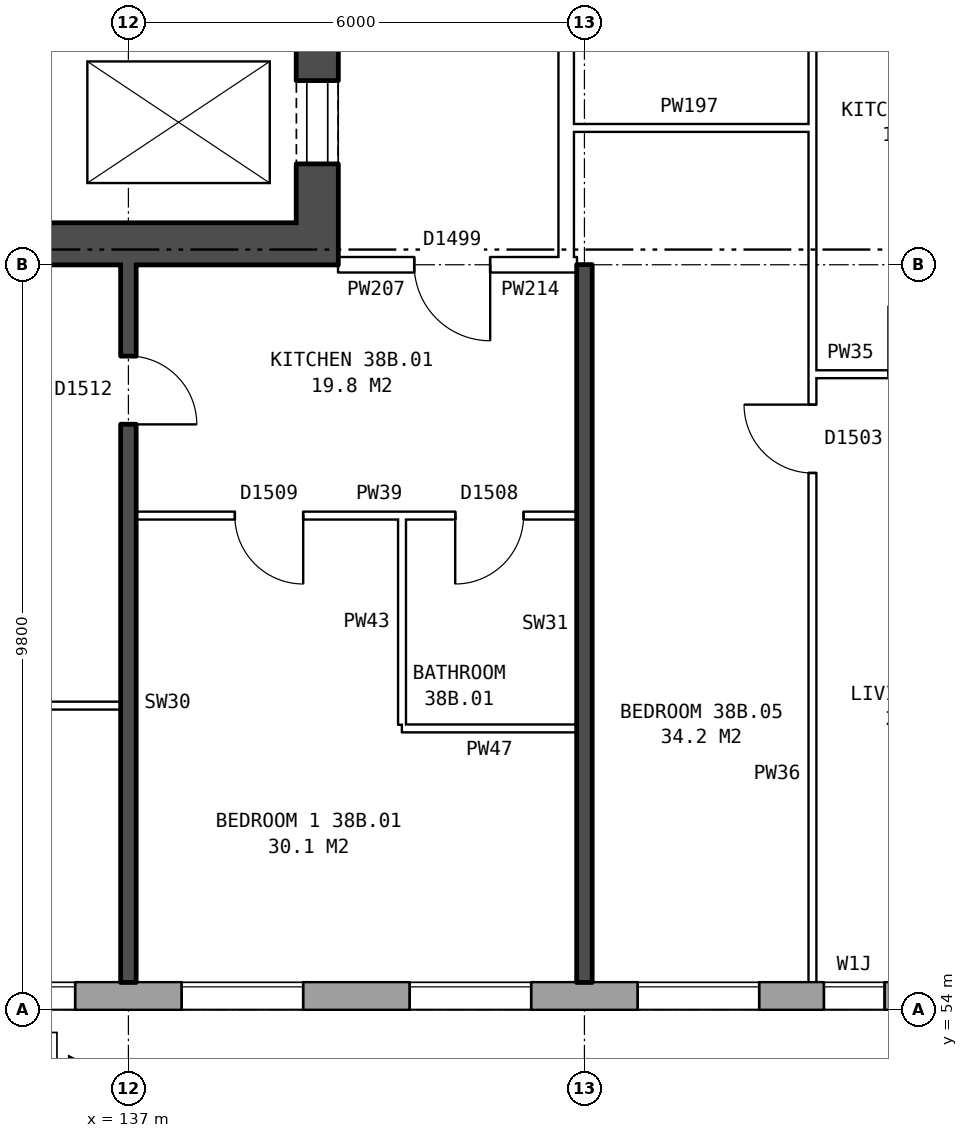
"""IFC4 building model, lengths in metres.
Left out: names, types, materials, properties, quantities, classifications, styles, units other than length and angle.
Written with IfcOpenShell. Run it as: python <this file> out.ifc"""

import sys

from ifc_helpers import new_model, si_unit, direction, frame, frame_2d, origin, place, context, subcontext, project, spatial, rectangle, extrude, element, fill, save


model = new_model("IFC4")
c1 = context("Model", 3, precision=1e-05, world=origin(), true_north=direction((0.0, 1.0)))
c2 = subcontext(c1, "Body", "Model", "MODEL_VIEW")
j1 = project(units=[si_unit("LENGTHUNIT", "METRE"), si_unit("PLANEANGLEUNIT", "RADIAN")], contexts=[c1])
p1 = place(None, origin())
s1 = spatial("IfcSite", under=j1, at=p1, CompositionType="ELEMENT")
p2 = place(p1, origin())
s2 = spatial("IfcBuilding", under=s1, at=p2, CompositionType="ELEMENT")
p3 = place(p2, frame((0.0, 0.0, 136.1)))
s3 = spatial("IfcBuildingStorey", under=s2, at=p3, CompositionType="ELEMENT", Elevation=136.1)
p4 = place(p3, frame((134.075, 54.18, 0.0), z_axis=(0.0, 0.0, 1.0), x_axis=(1.0, 0.0, 0.0)))
e1 = element("IfcWall", 1, at=p4, inside=s3, PredefinedType="STANDARD", context=c2, shape_type="SweptSolid", body=[
    extrude(rectangle(XDim=35.601, YDim=0.36, at=frame_2d((17.8, 0.0))), origin(), (0.0, 0.0, 1.0), 2.85),
])
p5 = place(p4, frame((0.625, 0.0, 0.8)))
e2 = element("IfcOpeningElement", 2, at=p5, cuts=e1, PredefinedType="OPENING", context=c2, shape_type="SweptSolid", body=[
    extrude(rectangle(XDim=1.6, YDim=1.8, at=frame_2d((0.8, 0.9))), frame((0.0, 0.19, 0.0), z_axis=(0.0, -1.0, 0.0), x_axis=(1.0, 0.0, 0.0)), (0.0, 0.0, 1.0), 0.38),
])
p6 = place(p4, frame((3.625, 0.0, 0.8)))
e3 = element("IfcOpeningElement", 3, at=p6, cuts=e1, PredefinedType="OPENING", context=c2, shape_type="SweptSolid", body=[
    extrude(rectangle(XDim=1.6, YDim=1.8, at=frame_2d((0.8, 0.9))), frame((0.0, 0.19, 0.0), z_axis=(0.0, -1.0, 0.0), x_axis=(1.0, 0.0, 0.0)), (0.0, 0.0, 1.0), 0.38),
])
p7 = place(p4, frame((6.625, 0.0, 0.8)))
e4 = element("IfcOpeningElement", 4, at=p7, cuts=e1, PredefinedType="OPENING", context=c2, shape_type="SweptSolid", body=[
    extrude(rectangle(XDim=1.6, YDim=1.8, at=frame_2d((0.8, 0.9))), frame((0.0, 0.19, 0.0), z_axis=(0.0, -1.0, 0.0), x_axis=(1.0, 0.0, 0.0)), (0.0, 0.0, 1.0), 0.38),
])
p8 = place(p4, frame((9.625, 0.0, 0.8)))
e5 = element("IfcOpeningElement", 5, at=p8, cuts=e1, PredefinedType="OPENING", context=c2, shape_type="SweptSolid", body=[
    extrude(rectangle(XDim=1.6, YDim=1.8, at=frame_2d((0.8, 0.9))), frame((0.0, 0.19, 0.0), z_axis=(0.0, -1.0, 0.0), x_axis=(1.0, 0.0, 0.0)), (0.0, 0.0, 1.0), 0.38),
])
p9 = place(p4, frame((12.075, 0.0, 1.05)))
e6 = element("IfcOpeningElement", 6, at=p9, cuts=e1, PredefinedType="OPENING", context=c2, shape_type="SweptSolid", body=[
    extrude(rectangle(XDim=0.8, YDim=1.5, at=frame_2d((0.4, 0.75))), frame((0.0, 0.19, 0.0), z_axis=(0.0, -1.0, 0.0), x_axis=(1.0, 0.0, 0.0)), (0.0, 0.0, 1.0), 0.38),
])
p10 = place(p4, frame((15.625, 0.0, 0.8)))
e7 = element("IfcOpeningElement", 7, at=p10, cuts=e1, PredefinedType="OPENING", context=c2, shape_type="SweptSolid", body=[
    extrude(rectangle(XDim=1.6, YDim=1.8, at=frame_2d((0.8, 0.9))), frame((0.0, 0.19, 0.0), z_axis=(0.0, -1.0, 0.0), x_axis=(1.0, 0.0, 0.0)), (0.0, 0.0, 1.0), 0.38),
])
p11 = place(p4, frame((18.625, 0.0, 0.8)))
e8 = element("IfcOpeningElement", 8, at=p11, cuts=e1, PredefinedType="OPENING", context=c2, shape_type="SweptSolid", body=[
    extrude(rectangle(XDim=1.6, YDim=1.8, at=frame_2d((0.8, 0.9))), frame((0.0, 0.19, 0.0), z_axis=(0.0, -1.0, 0.0), x_axis=(1.0, 0.0, 0.0)), (0.0, 0.0, 1.0), 0.38),
])
p12 = place(p4, frame((22.125, 0.0, 1.7)))
e9 = element("IfcOpeningElement", 9, at=p12, cuts=e1, PredefinedType="OPENING", context=c2, shape_type="SweptSolid", body=[
    extrude(rectangle(XDim=0.6, YDim=0.9, at=frame_2d((0.3, 0.45))), frame((0.0, 0.19, 0.0), z_axis=(0.0, -1.0, 0.0), x_axis=(1.0, 0.0, 0.0)), (0.0, 0.0, 1.0), 0.38),
])
p13 = place(p4, frame((24.625, 0.0, 0.8)))
e10 = element("IfcOpeningElement", 10, at=p13, cuts=e1, PredefinedType="OPENING", context=c2, shape_type="SweptSolid", body=[
    extrude(rectangle(XDim=1.6, YDim=1.8, at=frame_2d((0.8, 0.9))), frame((0.0, 0.19, 0.0), z_axis=(0.0, -1.0, 0.0), x_axis=(1.0, 0.0, 0.0)), (0.0, 0.0, 1.0), 0.38),
])
p14 = place(p4, frame((27.625, 0.0, 0.8)))
e11 = element("IfcOpeningElement", 11, at=p14, cuts=e1, PredefinedType="OPENING", context=c2, shape_type="SweptSolid", body=[
    extrude(rectangle(XDim=1.6, YDim=1.8, at=frame_2d((0.8, 0.9))), frame((0.0, 0.19, 0.0), z_axis=(0.0, -1.0, 0.0), x_axis=(1.0, 0.0, 0.0)), (0.0, 0.0, 1.0), 0.38),
])
p15 = place(p4, frame((30.625, 0.0, 0.8)))
e12 = element("IfcOpeningElement", 12, at=p15, cuts=e1, PredefinedType="OPENING", context=c2, shape_type="SweptSolid", body=[
    extrude(rectangle(XDim=1.6, YDim=1.8, at=frame_2d((0.8, 0.9))), frame((0.0, 0.19, 0.0), z_axis=(0.0, -1.0, 0.0), x_axis=(1.0, 0.0, 0.0)), (0.0, 0.0, 1.0), 0.38),
])
p16 = place(p4, frame((33.625, 0.0, 0.8)))
e13 = element("IfcOpeningElement", 13, at=p16, cuts=e1, PredefinedType="OPENING", context=c2, shape_type="SweptSolid", body=[
    extrude(rectangle(XDim=1.6, YDim=1.8, at=frame_2d((0.8, 0.9))), frame((0.0, 0.19, 0.0), z_axis=(0.0, -1.0, 0.0), x_axis=(1.0, 0.0, 0.0)), (0.0, 0.0, 1.0), 0.38),
])
p17 = place(p4, frame((13.975, 0.0, 0.15)))
e14 = element("IfcOpeningElement", 14, at=p17, cuts=e1, PredefinedType="OPENING", context=c2, shape_type="SweptSolid", body=[
    extrude(rectangle(XDim=0.6, YDim=0.9, at=frame_2d((0.3, 0.45))), frame((0.0, 0.19, 0.0), z_axis=(0.0, -1.0, 0.0), x_axis=(1.0, 0.0, 0.0)), (0.0, 0.0, 1.0), 0.38),
])
p18 = place(p4, frame((23.025, 0.0, 0.8)))
e15 = element("IfcOpeningElement", 15, at=p18, cuts=e1, PredefinedType="OPENING", context=c2, shape_type="SweptSolid", body=[
    extrude(rectangle(XDim=1.2, YDim=1.8, at=frame_2d((0.6, 0.9))), frame((0.0, 0.19, 0.0), z_axis=(0.0, -1.0, 0.0), x_axis=(1.0, 0.0, 0.0)), (0.0, 0.0, 1.0), 0.38),
])
p19 = place(p3, frame((139.485, 63.8, 0.0), z_axis=(0.0, 0.0, 1.0), x_axis=(0.0, 1.0, 0.0)))
e16 = element("IfcWall", 16, at=p19, inside=s3, PredefinedType="SHEAR", context=c2, shape_type="SweptSolid", body=[
    extrude(rectangle(XDim=12.4, YDim=0.55, at=frame_2d((6.2, 0.0))), origin(), (0.0, 0.0, 1.0), 2.85),
])
p20 = place(p19, frame((1.325, 0.0, 0.0)))
e17 = element("IfcOpeningElement", 17, at=p20, cuts=e16, PredefinedType="OPENING", context=c2, shape_type="SweptSolid", body=[
    extrude(rectangle(XDim=1.1, YDim=2.1, at=frame_2d((0.55, 1.05))), frame((0.0, 0.285, 0.0), z_axis=(0.0, -1.0, 0.0), x_axis=(1.0, 0.0, 0.0)), (0.0, 0.0, 1.0), 0.57),
])
p21 = place(p19, frame((3.6, 0.0, 0.0)))
e18 = element("IfcOpeningElement", 18, at=p21, cuts=e16, PredefinedType="OPENING", context=c2, shape_type="SweptSolid", body=[
    extrude(rectangle(XDim=1.1, YDim=2.1, at=frame_2d((0.55, 1.05))), frame((0.0, 0.285, 0.0), z_axis=(0.0, -1.0, 0.0), x_axis=(1.0, 0.0, 0.0)), (0.0, 0.0, 1.0), 0.57),
])
p22 = place(p19, frame((5.8, 0.0, 0.0)))
e19 = element("IfcOpeningElement", 19, at=p22, cuts=e16, PredefinedType="OPENING", context=c2, shape_type="SweptSolid", body=[
    extrude(rectangle(XDim=1.1, YDim=2.1, at=frame_2d((0.55, 1.05))), frame((0.0, 0.285, 0.0), z_axis=(0.0, -1.0, 0.0), x_axis=(1.0, 0.0, 0.0)), (0.0, 0.0, 1.0), 0.57),
])
p23 = place(p19, frame((9.9, 0.0, 0.0)))
e20 = element("IfcOpeningElement", 20, at=p23, cuts=e16, PredefinedType="OPENING", context=c2, shape_type="SweptSolid", body=[
    extrude(rectangle(XDim=1.1, YDim=2.1, at=frame_2d((0.55, 1.05))), frame((0.0, 0.285, 0.0), z_axis=(0.0, -1.0, 0.0), x_axis=(1.0, 0.0, 0.0)), (0.0, 0.0, 1.0), 0.57),
])
p24 = place(p19, frame((8.125, 0.0, 0.0)))
e21 = element("IfcOpeningElement", 21, at=p24, cuts=e16, PredefinedType="OPENING", context=c2, shape_type="SweptSolid", body=[
    extrude(rectangle(XDim=0.85, YDim=2.1, at=frame_2d((0.425, 1.05))), frame((0.0, 0.285, 0.0), z_axis=(0.0, -1.0, 0.0), x_axis=(1.0, 0.0, 0.0)), (0.0, 0.0, 1.0), 0.57),
])
p25 = place(p3, frame((139.21, 64.075, 0.0), z_axis=(0.0, 0.0, 1.0), x_axis=(-1.0, 0.0, 0.0)))
e22 = element("IfcWall", 22, at=p25, inside=s3, PredefinedType="SHEAR", context=c2, shape_type="SweptSolid", body=[
    extrude(rectangle(XDim=7.3, YDim=0.55, at=frame_2d((3.65, 0.0))), origin(), (0.0, 0.0, 1.0), 2.85),
])
p26 = place(p3, frame((142.76, 63.9, 0.0), z_axis=(0.0, 0.0, 1.0), x_axis=(0.0, 1.0, 0.0)))
e23 = element("IfcWall", 23, at=p26, inside=s3, PredefinedType="PARTITIONING", context=c2, shape_type="SweptSolid", body=[
    extrude(rectangle(XDim=12.2, YDim=0.2, at=frame_2d((6.1, 0.0))), origin(), (0.0, 0.0, 1.0), 2.85),
])
p27 = place(p26, frame((5.1, 0.0, 0.0)))
e24 = element("IfcOpeningElement", 24, at=p27, cuts=e23, PredefinedType="OPENING", context=c2, shape_type="SweptSolid", body=[
    extrude(rectangle(XDim=2.0, YDim=2.1, at=frame_2d((1.0, 1.05))), frame((0.0, 0.11, 0.0), z_axis=(0.0, -1.0, 0.0), x_axis=(1.0, 0.0, 0.0)), (0.0, 0.0, 1.0), 0.22),
])
p28 = place(p3, frame((140.6, 57.7, 0.0), z_axis=(0.0, 0.0, 1.0), x_axis=(1.0, 0.0, 0.0)))
e25 = element("IfcWall", 25, at=p28, inside=s3, PredefinedType="PARTITIONING", context=c2, shape_type="SweptSolid", body=[
    extrude(rectangle(XDim=2.3, YDim=0.1, at=frame_2d((1.15, 0.0))), origin(), (0.0, 0.0, 1.0), 2.85),
])
p29 = place(p3, frame((131.36, 58.0, 0.0), z_axis=(0.0, 0.0, 1.0), x_axis=(1.0, 0.0, 0.0)))
e26 = element("IfcWall", 26, at=p29, inside=s3, PredefinedType="PARTITIONING", context=c2, shape_type="SweptSolid", body=[
    extrude(rectangle(XDim=5.54, YDim=0.1, at=frame_2d((2.77, 0.0))), origin(), (0.0, 0.0, 1.0), 2.85),
])
p30 = place(p29, frame((2.32, 0.0, 0.0)))
e27 = element("IfcOpeningElement", 27, at=p30, cuts=e26, PredefinedType="OPENING", context=c2, shape_type="SweptSolid", body=[
    extrude(rectangle(XDim=0.9, YDim=2.1, at=frame_2d((0.45, 1.05))), frame((0.0, 0.06, 0.0), z_axis=(0.0, -1.0, 0.0), x_axis=(1.0, 0.0, 0.0)), (0.0, 0.0, 1.0), 0.12),
])
p31 = place(p3, frame((137.1, 60.5, 0.0), z_axis=(0.0, 0.0, 1.0), x_axis=(1.0, 0.0, 0.0)))
e28 = element("IfcWall", 28, at=p31, inside=s3, PredefinedType="PARTITIONING", context=c2, shape_type="SweptSolid", body=[
    extrude(rectangle(XDim=5.8, YDim=0.1, at=frame_2d((2.9, 0.0))), origin(), (0.0, 0.0, 1.0), 2.85),
])
p32 = place(p31, frame((1.3, 0.0, 0.0)))
e29 = element("IfcOpeningElement", 29, at=p32, cuts=e28, PredefinedType="OPENING", context=c2, shape_type="SweptSolid", body=[
    extrude(rectangle(XDim=0.9, YDim=2.1, at=frame_2d((0.45, 1.05))), frame((0.0, 0.06, 0.0), z_axis=(0.0, -1.0, 0.0), x_axis=(1.0, 0.0, 0.0)), (0.0, 0.0, 1.0), 0.12),
])
p33 = place(p31, frame((4.2, 0.0, 0.0)))
e30 = element("IfcOpeningElement", 30, at=p33, cuts=e28, PredefinedType="OPENING", context=c2, shape_type="SweptSolid", body=[
    extrude(rectangle(XDim=0.9, YDim=2.1, at=frame_2d((0.45, 1.05))), frame((0.0, 0.06, 0.0), z_axis=(0.0, -1.0, 0.0), x_axis=(1.0, 0.0, 0.0)), (0.0, 0.0, 1.0), 0.12),
])
p34 = place(p3, frame((146.0, 62.36, 0.0), z_axis=(0.0, 0.0, 1.0), x_axis=(1.0, 0.0, 0.0)))
e31 = element("IfcWall", 31, at=p34, inside=s3, PredefinedType="PARTITIONING", context=c2, shape_type="SweptSolid", body=[
    extrude(rectangle(XDim=2.9, YDim=0.1, at=frame_2d((1.45, 0.0))), origin(), (0.0, 0.0, 1.0), 2.85),
])
p35 = place(p34, frame((1.0, 0.0, 0.0)))
e32 = element("IfcOpeningElement", 32, at=p35, cuts=e31, PredefinedType="OPENING", context=c2, shape_type="SweptSolid", body=[
    extrude(rectangle(XDim=0.9, YDim=2.1, at=frame_2d((0.45, 1.05))), frame((0.0, 0.06, 0.0), z_axis=(0.0, -1.0, 0.0), x_axis=(1.0, 0.0, 0.0)), (0.0, 0.0, 1.0), 0.12),
])
p36 = place(p3, frame((139.76, 63.8, 0.0), z_axis=(0.0, 0.0, 1.0), x_axis=(1.0, 0.0, 0.0)))
e33 = element("IfcWall", 33, at=p36, inside=s3, PredefinedType="PARTITIONING", context=c2, shape_type="SweptSolid", body=[
    extrude(rectangle(XDim=3.0, YDim=0.2, at=frame_2d((1.5, 0.0))), origin(), (0.0, 0.0, 1.0), 2.85),
])
p37 = place(p36, frame((1.0, 0.0, 0.0)))
e34 = element("IfcOpeningElement", 34, at=p37, cuts=e33, PredefinedType="OPENING", context=c2, shape_type="SweptSolid", body=[
    extrude(rectangle(XDim=1.0, YDim=2.1, at=frame_2d((0.5, 1.05))), frame((0.0, 0.11, 0.0), z_axis=(0.0, -1.0, 0.0), x_axis=(1.0, 0.0, 0.0)), (0.0, 0.0, 1.0), 0.22),
])
p38 = place(p3, frame((142.76, 63.8, 0.0), z_axis=(0.0, 0.0, 1.0), x_axis=(1.0, 0.0, 0.0)))
e35 = element("IfcWall", 35, at=p38, inside=s3, PredefinedType="PARTITIONING", context=c2, shape_type="SweptSolid", body=[
    extrude(rectangle(XDim=0.14, YDim=0.2, at=frame_2d((0.07, 0.0))), origin(), (0.0, 0.0, 1.0), 2.85),
])
p39 = place(p3, frame((142.76, 65.6, 0.0), z_axis=(0.0, 0.0, 1.0), x_axis=(1.0, 0.0, 0.0)))
e36 = element("IfcWall", 36, at=p39, inside=s3, PredefinedType="PARTITIONING", context=c2, shape_type="SweptSolid", body=[
    extrude(rectangle(XDim=3.24, YDim=0.1, at=frame_2d((1.62, 0.0))), origin(), (0.0, 0.0, 1.0), 2.85),
])
p40 = place(p3, frame((137.0, 54.36, 0.0), z_axis=(0.0, 0.0, 1.0), x_axis=(0.0, 1.0, 0.0)))
e37 = element("IfcWall", 37, at=p40, inside=s3, PredefinedType="SOLIDWALL", context=c2, shape_type="SweptSolid", body=[
    extrude(rectangle(XDim=9.44, YDim=0.2, at=frame_2d((4.72, 0.0))), origin(), (0.0, 0.0, 1.0), 2.85),
])
p41 = place(p40, frame((7.34, 0.0, 0.0)))
e38 = element("IfcOpeningElement", 38, at=p41, cuts=e37, PredefinedType="OPENING", context=c2, shape_type="SweptSolid", body=[
    extrude(rectangle(XDim=0.9, YDim=2.1, at=frame_2d((0.45, 1.05))), frame((0.0, 0.11, 0.0), z_axis=(0.0, -1.0, 0.0), x_axis=(1.0, 0.0, 0.0)), (0.0, 0.0, 1.0), 0.22),
])
p42 = place(p3, frame((140.6, 57.75, 0.0), z_axis=(0.0, 0.0, 1.0), x_axis=(0.0, 1.0, 0.0)))
e39 = element("IfcWall", 39, at=p42, inside=s3, PredefinedType="PARTITIONING", context=c2, shape_type="SweptSolid", body=[
    extrude(rectangle(XDim=2.7, YDim=0.1, at=frame_2d((1.35, 0.0))), origin(), (0.0, 0.0, 1.0), 2.85),
])
p43 = place(p3, frame((143.0, 54.36, 0.0), z_axis=(0.0, 0.0, 1.0), x_axis=(0.0, 1.0, 0.0)))
e40 = element("IfcWall", 40, at=p43, inside=s3, PredefinedType="SOLIDWALL", context=c2, shape_type="SweptSolid", body=[
    extrude(rectangle(XDim=9.44, YDim=0.2, at=frame_2d((4.72, 0.0))), origin(), (0.0, 0.0, 1.0), 2.85),
])
p44 = place(p3, frame((146.0, 54.36, 0.0), z_axis=(0.0, 0.0, 1.0), x_axis=(0.0, 1.0, 0.0)))
e41 = element("IfcWall", 41, at=p44, inside=s3, PredefinedType="PARTITIONING", context=c2, shape_type="SweptSolid", body=[
    extrude(rectangle(XDim=14.34, YDim=0.1, at=frame_2d((7.17, 0.0))), origin(), (0.0, 0.0, 1.0), 2.85),
])
p45 = place(p44, frame((6.7, 0.0, 0.0)))
e42 = element("IfcOpeningElement", 42, at=p45, cuts=e41, PredefinedType="OPENING", context=c2, shape_type="SweptSolid", body=[
    extrude(rectangle(XDim=0.9, YDim=2.1, at=frame_2d((0.45, 1.05))), frame((0.0, 0.06, 0.0), z_axis=(0.0, -1.0, 0.0), x_axis=(1.0, 0.0, 0.0)), (0.0, 0.0, 1.0), 0.12),
])
p46 = place(p44, frame((13.04, 0.0, 0.0)))
e43 = element("IfcOpeningElement", 43, at=p46, cuts=e41, PredefinedType="OPENING", context=c2, shape_type="SweptSolid", body=[
    extrude(rectangle(XDim=0.9, YDim=2.1, at=frame_2d((0.45, 1.05))), frame((0.0, 0.06, 0.0), z_axis=(0.0, -1.0, 0.0), x_axis=(1.0, 0.0, 0.0)), (0.0, 0.0, 1.0), 0.12),
])
p47 = place(p5, origin())
e44 = element("IfcWindow", 44, at=p47, inside=s3, PartitioningType="SINGLE_PANEL", PredefinedType="WINDOW", context=c2, shape_type="SweptSolid", body=[
    extrude(rectangle(XDim=1.6, YDim=1.8, at=frame_2d((0.8, 0.9))), frame((0.0, 0.15, 0.0), z_axis=(0.0, -1.0, 0.0), x_axis=(1.0, 0.0, 0.0)), (0.0, 0.0, 1.0), 0.06),
])
fill(e2, e44)
p48 = place(p6, origin())
e45 = element("IfcWindow", 45, at=p48, inside=s3, PartitioningType="SINGLE_PANEL", PredefinedType="WINDOW", context=c2, shape_type="SweptSolid", body=[
    extrude(rectangle(XDim=1.6, YDim=1.8, at=frame_2d((0.8, 0.9))), frame((0.0, 0.15, 0.0), z_axis=(0.0, -1.0, 0.0), x_axis=(1.0, 0.0, 0.0)), (0.0, 0.0, 1.0), 0.06),
])
fill(e3, e45)
p49 = place(p7, origin())
e46 = element("IfcWindow", 46, at=p49, inside=s3, PartitioningType="SINGLE_PANEL", PredefinedType="WINDOW", context=c2, shape_type="SweptSolid", body=[
    extrude(rectangle(XDim=1.6, YDim=1.8, at=frame_2d((0.8, 0.9))), frame((0.0, 0.15, 0.0), z_axis=(0.0, -1.0, 0.0), x_axis=(1.0, 0.0, 0.0)), (0.0, 0.0, 1.0), 0.06),
])
fill(e4, e46)
p50 = place(p8, origin())
e47 = element("IfcWindow", 47, at=p50, inside=s3, PartitioningType="SINGLE_PANEL", PredefinedType="WINDOW", context=c2, shape_type="SweptSolid", body=[
    extrude(rectangle(XDim=1.6, YDim=1.8, at=frame_2d((0.8, 0.9))), frame((0.0, 0.15, 0.0), z_axis=(0.0, -1.0, 0.0), x_axis=(1.0, 0.0, 0.0)), (0.0, 0.0, 1.0), 0.06),
])
fill(e5, e47)
p51 = place(p9, origin())
e48 = element("IfcWindow", 48, at=p51, inside=s3, PartitioningType="SINGLE_PANEL", PredefinedType="WINDOW", context=c2, shape_type="SweptSolid", body=[
    extrude(rectangle(XDim=0.8, YDim=1.5, at=frame_2d((0.4, 0.75))), frame((0.0, 0.15, 0.0), z_axis=(0.0, -1.0, 0.0), x_axis=(1.0, 0.0, 0.0)), (0.0, 0.0, 1.0), 0.06),
])
fill(e6, e48)
p52 = place(p20, origin())
e49 = element("IfcDoor", 49, at=p52, inside=s3, OperationType="DOUBLE_DOOR_SLIDING", PredefinedType="DOOR", context=c2, shape_type="SweptSolid", body=[
    extrude(rectangle(XDim=1.1, YDim=2.1, at=frame_2d((0.55, 1.05))), frame((0.0, 0.26, 0.0), z_axis=(0.0, -1.0, 0.0), x_axis=(1.0, 0.0, 0.0)), (0.0, 0.0, 1.0), 0.05),
])
fill(e17, e49)
p53 = place(p32, frame((0.9, 0.0, 0.0), z_axis=(0.0, 0.0, 1.0), x_axis=(-1.0, 0.0, 0.0)))
e50 = element("IfcDoor", 50, at=p53, inside=s3, OperationType="SINGLE_SWING_LEFT", PredefinedType="DOOR", context=c2, shape_type="SweptSolid", body=[
    extrude(rectangle(XDim=0.9, YDim=2.1, at=frame_2d((0.45, 1.05))), frame((0.0, 0.025, 0.0), z_axis=(0.0, -1.0, 0.0), x_axis=(1.0, 0.0, 0.0)), (0.0, 0.0, 1.0), 0.05),
])
fill(e29, e50)
p54 = place(p37, frame((1.0, 0.0, 0.0), z_axis=(0.0, 0.0, 1.0), x_axis=(-1.0, 0.0, 0.0)))
e51 = element("IfcDoor", 51, at=p54, inside=s3, OperationType="SINGLE_SWING_LEFT", PredefinedType="DOOR", context=c2, shape_type="SweptSolid", body=[
    extrude(rectangle(XDim=1.0, YDim=2.1, at=frame_2d((0.5, 1.05))), frame((0.0, 0.025, 0.0), z_axis=(0.0, -1.0, 0.0), x_axis=(1.0, 0.0, 0.0)), (0.0, 0.0, 1.0), 0.05),
])
fill(e34, e51)
p55 = place(p41, frame((0.9, 0.0, 0.0), z_axis=(0.0, 0.0, 1.0), x_axis=(-1.0, 0.0, 0.0)))
e52 = element("IfcDoor", 52, at=p55, inside=s3, OperationType="SINGLE_SWING_RIGHT", PredefinedType="DOOR", context=c2, shape_type="SweptSolid", body=[
    extrude(rectangle(XDim=0.9, YDim=2.1, at=frame_2d((0.45, 1.05))), frame((0.0, 0.025, 0.0), z_axis=(0.0, -1.0, 0.0), x_axis=(1.0, 0.0, 0.0)), (0.0, 0.0, 1.0), 0.05),
])
fill(e38, e52)
p56 = place(p33, frame((0.9, 0.0, 0.0), z_axis=(0.0, 0.0, 1.0), x_axis=(-1.0, 0.0, 0.0)))
e53 = element("IfcDoor", 53, at=p56, inside=s3, OperationType="SINGLE_SWING_RIGHT", PredefinedType="DOOR", context=c2, shape_type="SweptSolid", body=[
    extrude(rectangle(XDim=0.9, YDim=2.1, at=frame_2d((0.45, 1.05))), frame((0.0, 0.025, 0.0), z_axis=(0.0, -1.0, 0.0), x_axis=(1.0, 0.0, 0.0)), (0.0, 0.0, 1.0), 0.05),
])
fill(e30, e53)
p57 = place(p45, origin())
e54 = element("IfcDoor", 54, at=p57, inside=s3, OperationType="SINGLE_SWING_RIGHT", PredefinedType="DOOR", context=c2, shape_type="SweptSolid", body=[
    extrude(rectangle(XDim=0.9, YDim=2.1, at=frame_2d((0.45, 1.05))), frame((0.0, 0.025, 0.0), z_axis=(0.0, -1.0, 0.0), x_axis=(1.0, 0.0, 0.0)), (0.0, 0.0, 1.0), 0.05),
])
fill(e42, e54)
save(model, sys.argv[1])
